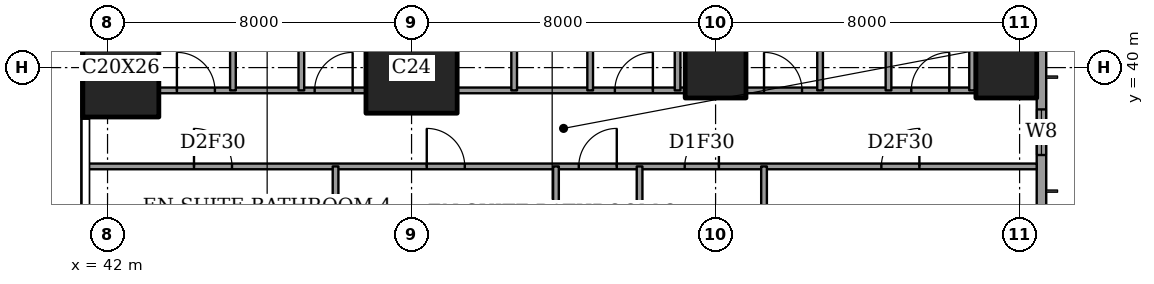
"""IFC4 building model, lengths in metres.
Left out: names, types, materials, properties, quantities, classifications, styles, units other than length and angle.
Written with IfcOpenShell. Run it as: python <this file> out.ifc"""

import sys

from ifc_helpers import new_model, si_unit, direction, frame, frame_2d, origin, origin_2d, place, context, subcontext, project, spatial, rectangle, extrude, element, fill, save


model = new_model("IFC4")
c1 = context("Model", 3, precision=1e-05, world=origin(), true_north=direction((0.0, 1.0)))
c2 = subcontext(c1, "Body", "Model", "MODEL_VIEW")
j1 = project(units=[si_unit("LENGTHUNIT", "METRE"), si_unit("PLANEANGLEUNIT", "RADIAN")], contexts=[c1])
p1 = place(None, origin())
s1 = spatial("IfcSite", under=j1, at=p1, CompositionType="ELEMENT")
p2 = place(p1, origin())
s2 = spatial("IfcBuilding", under=s1, at=p2, CompositionType="ELEMENT")
p3 = place(p2, frame((0.0, 0.0, 259.2)))
s3 = spatial("IfcBuildingStorey", under=s2, at=p3, CompositionType="ELEMENT", Elevation=259.2)
p4 = place(p3, frame((42.35, 40.0, 0.0), z_axis=(0.0, 0.0, 1.0), x_axis=(1.0, 0.0, 0.0)))
e1 = element("IfcColumn", 1, at=p4, inside=s3, PredefinedType="COLUMN", context=c2, shape_type="SweptSolid", body=[
    extrude(rectangle(XDim=2.0, YDim=2.6, at=origin_2d()), origin(), (0.0, 0.0, 1.0), 3.6),
])
p5 = place(p3, frame((50.0, 40.0, 0.0), z_axis=(0.0, 0.0, 1.0), x_axis=(1.0, 0.0, 0.0)))
e2 = element("IfcColumn", 2, at=p5, inside=s3, PredefinedType="COLUMN", context=c2, shape_type="SweptSolid", body=[
    extrude(rectangle(XDim=2.4, YDim=2.4, at=origin_2d()), origin(), (0.0, 0.0, 1.0), 3.6),
])
for number, where, z_axis, x_axis in (
    (3, (58.0, 40.0, 0.0), (0.0, 0.0, 1.0), (1.0, 0.0, 0.0)),
    (4, (65.65, 40.0, 0.0), (0.0, 0.0, 1.0), (1.0, 0.0, 0.0)),
):
    element("IfcColumn", number, at=place(p3, frame(where, z_axis=z_axis, x_axis=x_axis)), inside=s3, PredefinedType="COLUMN", context=c2, shape_type="SweptSolid", body=[
        extrude(rectangle(XDim=1.6, YDim=1.6, at=origin_2d()), origin(), (0.0, 0.0, 1.0), 3.6),
    ])
p6 = place(p3, frame((66.575, 3.175, 0.0), z_axis=(0.0, 0.0, 1.0), x_axis=(0.0, 1.0, 0.0)))
e5 = element("IfcWall", 5, at=p6, inside=s3, PredefinedType="SOLIDWALL", context=c2, shape_type="SweptSolid", body=[
    extrude(rectangle(XDim=41.65, YDim=0.25, at=frame_2d((20.825, 0.0))), origin(), (0.0, 0.0, 1.0), 3.6),
])
p7 = place(p6, frame((0.875, 0.0, 0.6)))
e6 = element("IfcOpeningElement", 6, at=p7, cuts=e5, PredefinedType="OPENING", context=c2, shape_type="SweptSolid", body=[
    extrude(rectangle(XDim=2.4, YDim=2.0, at=frame_2d((1.2, 1.0))), frame((0.0, 0.135, 0.0), z_axis=(0.0, -1.0, 0.0), x_axis=(1.0, 0.0, 0.0)), (0.0, 0.0, 1.0), 0.27),
])
p8 = place(p6, frame((6.6, 0.0, 0.6)))
e7 = element("IfcOpeningElement", 7, at=p8, cuts=e5, PredefinedType="OPENING", context=c2, shape_type="SweptSolid", body=[
    extrude(rectangle(XDim=1.2, YDim=2.0, at=frame_2d((0.6, 1.0))), frame((0.0, 0.135, 0.0), z_axis=(0.0, -1.0, 0.0), x_axis=(1.0, 0.0, 0.0)), (0.0, 0.0, 1.0), 0.27),
])
p9 = place(p6, frame((8.825, 0.0, 0.6)))
e8 = element("IfcOpeningElement", 8, at=p9, cuts=e5, PredefinedType="OPENING", context=c2, shape_type="SweptSolid", body=[
    extrude(rectangle(XDim=2.4, YDim=2.0, at=frame_2d((1.2, 1.0))), frame((0.0, 0.135, 0.0), z_axis=(0.0, -1.0, 0.0), x_axis=(1.0, 0.0, 0.0)), (0.0, 0.0, 1.0), 0.27),
])
p10 = place(p6, frame((15.725, 0.0, 0.6)))
e9 = element("IfcOpeningElement", 9, at=p10, cuts=e5, PredefinedType="OPENING", context=c2, shape_type="SweptSolid", body=[
    extrude(rectangle(XDim=2.4, YDim=2.0, at=frame_2d((1.2, 1.0))), frame((0.0, 0.135, 0.0), z_axis=(0.0, -1.0, 0.0), x_axis=(1.0, 0.0, 0.0)), (0.0, 0.0, 1.0), 0.27),
])
p11 = place(p6, frame((23.625, 0.0, 0.6)))
e10 = element("IfcOpeningElement", 10, at=p11, cuts=e5, PredefinedType="OPENING", context=c2, shape_type="SweptSolid", body=[
    extrude(rectangle(XDim=2.4, YDim=2.0, at=frame_2d((1.2, 1.0))), frame((0.0, 0.135, 0.0), z_axis=(0.0, -1.0, 0.0), x_axis=(1.0, 0.0, 0.0)), (0.0, 0.0, 1.0), 0.27),
])
p12 = place(p6, frame((30.725, 0.0, 0.6)))
e11 = element("IfcOpeningElement", 11, at=p12, cuts=e5, PredefinedType="OPENING", context=c2, shape_type="SweptSolid", body=[
    extrude(rectangle(XDim=2.4, YDim=2.0, at=frame_2d((1.2, 1.0))), frame((0.0, 0.135, 0.0), z_axis=(0.0, -1.0, 0.0), x_axis=(1.0, 0.0, 0.0)), (0.0, 0.0, 1.0), 0.27),
])
p13 = place(p6, frame((34.525, 0.0, 0.6)))
e12 = element("IfcOpeningElement", 12, at=p13, cuts=e5, PredefinedType="OPENING", context=c2, shape_type="SweptSolid", body=[
    extrude(rectangle(XDim=1.2, YDim=2.0, at=frame_2d((0.6, 1.0))), frame((0.0, 0.135, 0.0), z_axis=(0.0, -1.0, 0.0), x_axis=(1.0, 0.0, 0.0)), (0.0, 0.0, 1.0), 0.27),
])
p14 = place(p6, frame((38.375, 0.0, 0.6)))
e13 = element("IfcOpeningElement", 13, at=p14, cuts=e5, PredefinedType="OPENING", context=c2, shape_type="SweptSolid", body=[
    extrude(rectangle(XDim=2.4, YDim=2.0, at=frame_2d((1.2, 1.0))), frame((0.0, 0.135, 0.0), z_axis=(0.0, -1.0, 0.0), x_axis=(1.0, 0.0, 0.0)), (0.0, 0.0, 1.0), 0.27),
])
p15 = place(p3, frame((41.439, 37.4, 0.0), z_axis=(0.0, 0.0, 1.0), x_axis=(1.0, 0.0, 0.0)))
e14 = element("IfcWall", 14, at=p15, inside=s3, PredefinedType="PARTITIONING", context=c2, shape_type="SweptSolid", body=[
    extrude(rectangle(XDim=25.011, YDim=0.15, at=frame_2d((12.505, 0.0))), origin(), (0.0, 0.0, 1.0), 3.35),
])
p16 = place(p15, frame((12.961, 0.0, 0.0)))
e15 = element("IfcOpeningElement", 15, at=p16, cuts=e14, PredefinedType="OPENING", context=c2, shape_type="SweptSolid", body=[
    extrude(rectangle(XDim=1.0, YDim=2.1, at=frame_2d((0.5, 1.05))), frame((0.0, 0.085, 0.0), z_axis=(0.0, -1.0, 0.0), x_axis=(1.0, 0.0, 0.0)), (0.0, 0.0, 1.0), 0.17),
])
p17 = place(p15, frame((20.924, 0.0, 0.0)))
e16 = element("IfcOpeningElement", 16, at=p17, cuts=e14, PredefinedType="OPENING", context=c2, shape_type="SweptSolid", body=[
    extrude(rectangle(XDim=1.0, YDim=2.1, at=frame_2d((0.5, 1.05))), frame((0.0, 0.085, 0.0), z_axis=(0.0, -1.0, 0.0), x_axis=(1.0, 0.0, 0.0)), (0.0, 0.0, 1.0), 0.17),
])
p18 = place(p15, frame((15.749, 0.0, 0.0)))
e17 = element("IfcOpeningElement", 17, at=p18, cuts=e14, PredefinedType="OPENING", context=c2, shape_type="SweptSolid", body=[
    extrude(rectangle(XDim=0.9, YDim=2.1, at=frame_2d((0.45, 1.05))), frame((0.0, 0.085, 0.0), z_axis=(0.0, -1.0, 0.0), x_axis=(1.0, 0.0, 0.0)), (0.0, 0.0, 1.0), 0.17),
])
p19 = place(p15, frame((8.961, 0.0, 0.0)))
e18 = element("IfcOpeningElement", 18, at=p19, cuts=e14, PredefinedType="OPENING", context=c2, shape_type="SweptSolid", body=[
    extrude(rectangle(XDim=1.0, YDim=2.1, at=frame_2d((0.5, 1.05))), frame((0.0, 0.085, 0.0), z_axis=(0.0, -1.0, 0.0), x_axis=(1.0, 0.0, 0.0)), (0.0, 0.0, 1.0), 0.17),
])
p20 = place(p15, frame((2.836, 0.0, 0.0)))
e19 = element("IfcOpeningElement", 19, at=p20, cuts=e14, PredefinedType="OPENING", context=c2, shape_type="SweptSolid", body=[
    extrude(rectangle(XDim=1.0, YDim=2.1, at=frame_2d((0.5, 1.05))), frame((0.0, 0.085, 0.0), z_axis=(0.0, -1.0, 0.0), x_axis=(1.0, 0.0, 0.0)), (0.0, 0.0, 1.0), 0.17),
])
p21 = place(p3, frame((43.35, 39.4, 0.0), z_axis=(0.0, 0.0, 1.0), x_axis=(1.0, 0.0, 0.0)))
e20 = element("IfcWall", 20, at=p21, inside=s3, PredefinedType="PARTITIONING", context=c2, shape_type="SweptSolid", body=[
    extrude(rectangle(XDim=5.45, YDim=0.15, at=frame_2d((2.725, 0.0))), origin(), (0.0, 0.0, 1.0), 3.35),
])
p22 = place(p21, frame((4.1, 0.0, 0.0)))
e21 = element("IfcOpeningElement", 21, at=p22, cuts=e20, PredefinedType="OPENING", context=c2, shape_type="SweptSolid", body=[
    extrude(rectangle(XDim=1.0, YDim=2.1, at=frame_2d((0.5, 1.05))), frame((0.0, 0.085, 0.0), z_axis=(0.0, -1.0, 0.0), x_axis=(1.0, 0.0, 0.0)), (0.0, 0.0, 1.0), 0.17),
])
p23 = place(p21, frame((0.475, 0.0, 0.0)))
e22 = element("IfcOpeningElement", 22, at=p23, cuts=e20, PredefinedType="OPENING", context=c2, shape_type="SweptSolid", body=[
    extrude(rectangle(XDim=1.0, YDim=2.1, at=frame_2d((0.5, 1.05))), frame((0.0, 0.085, 0.0), z_axis=(0.0, -1.0, 0.0), x_axis=(1.0, 0.0, 0.0)), (0.0, 0.0, 1.0), 0.17),
])
p24 = place(p3, frame((51.2, 39.4, 0.0), z_axis=(0.0, 0.0, 1.0), x_axis=(1.0, 0.0, 0.0)))
e23 = element("IfcWall", 23, at=p24, inside=s3, PredefinedType="PARTITIONING", context=c2, shape_type="SweptSolid", body=[
    extrude(rectangle(XDim=6.0, YDim=0.15, at=frame_2d((3.0, 0.0))), origin(), (0.0, 0.0, 1.0), 3.35),
])
p25 = place(p24, frame((4.15, 0.0, 0.0)))
e24 = element("IfcOpeningElement", 24, at=p25, cuts=e23, PredefinedType="OPENING", context=c2, shape_type="SweptSolid", body=[
    extrude(rectangle(XDim=1.0, YDim=2.1, at=frame_2d((0.5, 1.05))), frame((0.0, 0.085, 0.0), z_axis=(0.0, -1.0, 0.0), x_axis=(1.0, 0.0, 0.0)), (0.0, 0.0, 1.0), 0.17),
])
p26 = place(p3, frame((58.8, 39.4, 0.0), z_axis=(0.0, 0.0, 1.0), x_axis=(1.0, 0.0, 0.0)))
e25 = element("IfcWall", 25, at=p26, inside=s3, PredefinedType="PARTITIONING", context=c2, shape_type="SweptSolid", body=[
    extrude(rectangle(XDim=6.05, YDim=0.15, at=frame_2d((3.025, 0.0))), origin(), (0.0, 0.0, 1.0), 3.35),
])
p27 = place(p26, frame((4.35, 0.0, 0.0)))
e26 = element("IfcOpeningElement", 26, at=p27, cuts=e25, PredefinedType="OPENING", context=c2, shape_type="SweptSolid", body=[
    extrude(rectangle(XDim=1.0, YDim=2.1, at=frame_2d((0.5, 1.05))), frame((0.0, 0.085, 0.0), z_axis=(0.0, -1.0, 0.0), x_axis=(1.0, 0.0, 0.0)), (0.0, 0.0, 1.0), 0.17),
])
p28 = place(p26, frame((0.475, 0.0, 0.0)))
e27 = element("IfcOpeningElement", 27, at=p28, cuts=e25, PredefinedType="OPENING", context=c2, shape_type="SweptSolid", body=[
    extrude(rectangle(XDim=1.0, YDim=2.1, at=frame_2d((0.5, 1.05))), frame((0.0, 0.085, 0.0), z_axis=(0.0, -1.0, 0.0), x_axis=(1.0, 0.0, 0.0)), (0.0, 0.0, 1.0), 0.17),
])
p29 = place(p3, frame((45.3, 39.4, 0.0), z_axis=(0.0, 0.0, 1.0), x_axis=(0.0, 1.0, 0.0)))
e28 = element("IfcWall", 28, at=p29, inside=s3, PredefinedType="PARTITIONING", context=c2, shape_type="SweptSolid", body=[
    extrude(rectangle(XDim=9.05, YDim=0.15, at=frame_2d((4.525, 0.0))), origin(), (0.0, 0.0, 1.0), 3.35),
])
p30 = place(p3, frame((47.1, 39.4, 0.0), z_axis=(0.0, 0.0, 1.0), x_axis=(0.0, 1.0, 0.0)))
e29 = element("IfcWall", 29, at=p30, inside=s3, PredefinedType="PARTITIONING", context=c2, shape_type="SweptSolid", body=[
    extrude(rectangle(XDim=3.5, YDim=0.15, at=frame_2d((1.75, 0.0))), origin(), (0.0, 0.0, 1.0), 3.35),
])
p31 = place(p30, frame((1.3, 0.0, 0.0)))
e30 = element("IfcOpeningElement", 30, at=p31, cuts=e29, PredefinedType="OPENING", context=c2, shape_type="SweptSolid", body=[
    extrude(rectangle(XDim=0.9, YDim=2.1, at=frame_2d((0.45, 1.05))), frame((0.0, 0.085, 0.0), z_axis=(0.0, -1.0, 0.0), x_axis=(1.0, 0.0, 0.0)), (0.0, 0.0, 1.0), 0.17),
])
p32 = place(p3, frame((48.0, 28.0, 0.0), z_axis=(0.0, 0.0, 1.0), x_axis=(0.0, 1.0, 0.0)))
e31 = element("IfcWall", 31, at=p32, inside=s3, PredefinedType="PARTITIONING", context=c2, shape_type="SweptSolid", body=[
    extrude(rectangle(XDim=9.4, YDim=0.15, at=frame_2d((4.7, 0.0))), origin(), (0.0, 0.0, 1.0), 3.35),
])
p33 = place(p32, frame((0.837, 0.0, 0.0)))
e32 = element("IfcOpeningElement", 32, at=p33, cuts=e31, PredefinedType="OPENING", context=c2, shape_type="SweptSolid", body=[
    extrude(rectangle(XDim=1.0, YDim=2.1, at=frame_2d((0.5, 1.05))), frame((0.0, 0.085, 0.0), z_axis=(0.0, -1.0, 0.0), x_axis=(1.0, 0.0, 0.0)), (0.0, 0.0, 1.0), 0.17),
])
p34 = place(p3, frame((52.7, 39.4, 0.0), z_axis=(0.0, 0.0, 1.0), x_axis=(0.0, 1.0, 0.0)))
e33 = element("IfcWall", 33, at=p34, inside=s3, PredefinedType="PARTITIONING", context=c2, shape_type="SweptSolid", body=[
    extrude(rectangle(XDim=9.05, YDim=0.15, at=frame_2d((4.525, 0.0))), origin(), (0.0, 0.0, 1.0), 3.35),
])
p35 = place(p34, frame((5.675, 0.0, 0.0)))
e34 = element("IfcOpeningElement", 34, at=p35, cuts=e33, PredefinedType="OPENING", context=c2, shape_type="SweptSolid", body=[
    extrude(rectangle(XDim=0.9, YDim=2.1, at=frame_2d((0.45, 1.05))), frame((0.0, 0.085, 0.0), z_axis=(0.0, -1.0, 0.0), x_axis=(1.0, 0.0, 0.0)), (0.0, 0.0, 1.0), 0.17),
])
p36 = place(p3, frame((53.8, 30.675, 0.0), z_axis=(0.0, 0.0, 1.0), x_axis=(0.0, 1.0, 0.0)))
e35 = element("IfcWall", 35, at=p36, inside=s3, PredefinedType="PARTITIONING", context=c2, shape_type="SweptSolid", body=[
    extrude(rectangle(XDim=6.725, YDim=0.15, at=frame_2d((3.362, 0.0))), origin(), (0.0, 0.0, 1.0), 3.35),
])
p37 = place(p3, frame((54.7, 39.4, 0.0), z_axis=(0.0, 0.0, 1.0), x_axis=(0.0, 1.0, 0.0)))
e36 = element("IfcWall", 36, at=p37, inside=s3, PredefinedType="PARTITIONING", context=c2, shape_type="SweptSolid", body=[
    extrude(rectangle(XDim=3.2, YDim=0.15, at=frame_2d((1.6, 0.0))), origin(), (0.0, 0.0, 1.0), 3.35),
])
p38 = place(p37, frame((1.15, 0.0, 0.0)))
e37 = element("IfcOpeningElement", 37, at=p38, cuts=e36, PredefinedType="OPENING", context=c2, shape_type="SweptSolid", body=[
    extrude(rectangle(XDim=0.9, YDim=2.1, at=frame_2d((0.45, 1.05))), frame((0.0, 0.085, 0.0), z_axis=(0.0, -1.0, 0.0), x_axis=(1.0, 0.0, 0.0)), (0.0, 0.0, 1.0), 0.17),
])
p39 = place(p3, frame((56.0, 28.0, 0.0), z_axis=(0.0, 0.0, 1.0), x_axis=(0.0, 1.0, 0.0)))
e38 = element("IfcWall", 38, at=p39, inside=s3, PredefinedType="PARTITIONING", context=c2, shape_type="SweptSolid", body=[
    extrude(rectangle(XDim=9.4, YDim=0.15, at=frame_2d((4.7, 0.0))), origin(), (0.0, 0.0, 1.0), 3.35),
])
p40 = place(p39, frame((0.837, 0.0, 0.0)))
e39 = element("IfcOpeningElement", 39, at=p40, cuts=e38, PredefinedType="OPENING", context=c2, shape_type="SweptSolid", body=[
    extrude(rectangle(XDim=1.0, YDim=2.1, at=frame_2d((0.5, 1.05))), frame((0.0, 0.085, 0.0), z_axis=(0.0, -1.0, 0.0), x_axis=(1.0, 0.0, 0.0)), (0.0, 0.0, 1.0), 0.17),
])
p41 = place(p3, frame((57.0, 39.4, 0.0), z_axis=(0.0, 0.0, 1.0), x_axis=(0.0, 1.0, 0.0)))
e40 = element("IfcWall", 40, at=p41, inside=s3, PredefinedType="PARTITIONING", context=c2, shape_type="SweptSolid", body=[
    extrude(rectangle(XDim=9.05, YDim=0.15, at=frame_2d((4.525, 0.0))), origin(), (0.0, 0.0, 1.0), 3.35),
])
p42 = place(p3, frame((59.275, 33.2, 0.0), z_axis=(0.0, 0.0, 1.0), x_axis=(0.0, 1.0, 0.0)))
e41 = element("IfcWall", 41, at=p42, inside=s3, PredefinedType="PARTITIONING", context=c2, shape_type="SweptSolid", body=[
    extrude(rectangle(XDim=4.2, YDim=0.15, at=frame_2d((2.1, 0.0))), origin(), (0.0, 0.0, 1.0), 3.35),
])
p43 = place(p3, frame((60.75, 39.4, 0.0), z_axis=(0.0, 0.0, 1.0), x_axis=(0.0, 1.0, 0.0)))
e42 = element("IfcWall", 42, at=p43, inside=s3, PredefinedType="PARTITIONING", context=c2, shape_type="SweptSolid", body=[
    extrude(rectangle(XDim=9.05, YDim=0.15, at=frame_2d((4.525, 0.0))), origin(), (0.0, 0.0, 1.0), 3.35),
])
p44 = place(p3, frame((62.55, 39.4, 0.0), z_axis=(0.0, 0.0, 1.0), x_axis=(0.0, 1.0, 0.0)))
e43 = element("IfcWall", 43, at=p44, inside=s3, PredefinedType="PARTITIONING", context=c2, shape_type="SweptSolid", body=[
    extrude(rectangle(XDim=3.5, YDim=0.15, at=frame_2d((1.75, 0.0))), origin(), (0.0, 0.0, 1.0), 3.35),
])
p45 = place(p44, frame((1.3, 0.0, 0.0)))
e44 = element("IfcOpeningElement", 44, at=p45, cuts=e43, PredefinedType="OPENING", context=c2, shape_type="SweptSolid", body=[
    extrude(rectangle(XDim=0.9, YDim=2.1, at=frame_2d((0.45, 1.05))), frame((0.0, 0.085, 0.0), z_axis=(0.0, -1.0, 0.0), x_axis=(1.0, 0.0, 0.0)), (0.0, 0.0, 1.0), 0.17),
])
p46 = place(p3, frame((64.75, 39.4, 0.0), z_axis=(0.0, 0.0, 1.0), x_axis=(0.0, 1.0, 0.0)))
e45 = element("IfcWall", 45, at=p46, inside=s3, PredefinedType="PARTITIONING", context=c2, shape_type="SweptSolid", body=[
    extrude(rectangle(XDim=5.3, YDim=0.15, at=frame_2d((2.65, 0.0))), origin(), (0.0, 0.0, 1.0), 3.35),
])
p47 = place(p46, frame((2.2, 0.0, 0.0)))
e46 = element("IfcOpeningElement", 46, at=p47, cuts=e45, PredefinedType="OPENING", context=c2, shape_type="SweptSolid", body=[
    extrude(rectangle(XDim=0.9, YDim=2.1, at=frame_2d((0.45, 1.05))), frame((0.0, 0.085, 0.0), z_axis=(0.0, -1.0, 0.0), x_axis=(1.0, 0.0, 0.0)), (0.0, 0.0, 1.0), 0.17),
])
p48 = place(p13, origin())
e47 = element("IfcWindow", 47, at=p48, inside=s3, PartitioningType="SINGLE_PANEL", PredefinedType="WINDOW", context=c2, shape_type="SweptSolid", body=[
    extrude(rectangle(XDim=1.2, YDim=2.0, at=frame_2d((0.6, 1.0))), frame((0.0, 0.03, 0.0), z_axis=(0.0, -1.0, 0.0), x_axis=(1.0, 0.0, 0.0)), (0.0, 0.0, 1.0), 0.06),
])
fill(e12, e47)
p49 = place(p27, origin())
e48 = element("IfcDoor", 48, at=p49, inside=s3, OperationType="SINGLE_SWING_LEFT", PredefinedType="DOOR", context=c2, shape_type="SweptSolid", body=[
    extrude(rectangle(XDim=1.0, YDim=2.1, at=frame_2d((0.5, 1.05))), frame((0.0, 0.025, 0.0), z_axis=(0.0, -1.0, 0.0), x_axis=(1.0, 0.0, 0.0)), (0.0, 0.0, 1.0), 0.05),
])
fill(e26, e48)
p50 = place(p28, origin())
e49 = element("IfcDoor", 49, at=p50, inside=s3, OperationType="SINGLE_SWING_RIGHT", PredefinedType="DOOR", context=c2, shape_type="SweptSolid", body=[
    extrude(rectangle(XDim=1.0, YDim=2.1, at=frame_2d((0.5, 1.05))), frame((0.0, 0.025, 0.0), z_axis=(0.0, -1.0, 0.0), x_axis=(1.0, 0.0, 0.0)), (0.0, 0.0, 1.0), 0.05),
])
fill(e27, e49)
p51 = place(p25, origin())
e50 = element("IfcDoor", 50, at=p51, inside=s3, OperationType="SINGLE_SWING_LEFT", PredefinedType="DOOR", context=c2, shape_type="SweptSolid", body=[
    extrude(rectangle(XDim=1.0, YDim=2.1, at=frame_2d((0.5, 1.05))), frame((0.0, 0.025, 0.0), z_axis=(0.0, -1.0, 0.0), x_axis=(1.0, 0.0, 0.0)), (0.0, 0.0, 1.0), 0.05),
])
fill(e24, e50)
p52 = place(p22, origin())
e51 = element("IfcDoor", 51, at=p52, inside=s3, OperationType="SINGLE_SWING_LEFT", PredefinedType="DOOR", context=c2, shape_type="SweptSolid", body=[
    extrude(rectangle(XDim=1.0, YDim=2.1, at=frame_2d((0.5, 1.05))), frame((0.0, 0.025, 0.0), z_axis=(0.0, -1.0, 0.0), x_axis=(1.0, 0.0, 0.0)), (0.0, 0.0, 1.0), 0.05),
])
fill(e21, e51)
p53 = place(p23, origin())
e52 = element("IfcDoor", 52, at=p53, inside=s3, OperationType="SINGLE_SWING_RIGHT", PredefinedType="DOOR", context=c2, shape_type="SweptSolid", body=[
    extrude(rectangle(XDim=1.0, YDim=2.1, at=frame_2d((0.5, 1.05))), frame((0.0, 0.025, 0.0), z_axis=(0.0, -1.0, 0.0), x_axis=(1.0, 0.0, 0.0)), (0.0, 0.0, 1.0), 0.05),
])
fill(e22, e52)
p54 = place(p16, origin())
e53 = element("IfcDoor", 53, at=p54, inside=s3, OperationType="SINGLE_SWING_LEFT", PredefinedType="DOOR", context=c2, shape_type="SweptSolid", body=[
    extrude(rectangle(XDim=1.0, YDim=2.1, at=frame_2d((0.5, 1.05))), frame((0.0, 0.025, 0.0), z_axis=(0.0, -1.0, 0.0), x_axis=(1.0, 0.0, 0.0)), (0.0, 0.0, 1.0), 0.05),
])
fill(e15, e53)
p55 = place(p17, origin())
e54 = element("IfcDoor", 54, at=p55, inside=s3, OperationType="SINGLE_SWING_LEFT", PredefinedType="DOOR", context=c2, shape_type="SweptSolid", body=[
    extrude(rectangle(XDim=1.0, YDim=2.1, at=frame_2d((0.5, 1.05))), frame((0.0, 0.025, 0.0), z_axis=(0.0, -1.0, 0.0), x_axis=(1.0, 0.0, 0.0)), (0.0, 0.0, 1.0), 0.05),
])
fill(e16, e54)
p56 = place(p18, origin())
e55 = element("IfcDoor", 55, at=p56, inside=s3, OperationType="SINGLE_SWING_LEFT", PredefinedType="DOOR", context=c2, shape_type="SweptSolid", body=[
    extrude(rectangle(XDim=0.9, YDim=2.1, at=frame_2d((0.45, 1.05))), frame((0.0, 0.025, 0.0), z_axis=(0.0, -1.0, 0.0), x_axis=(1.0, 0.0, 0.0)), (0.0, 0.0, 1.0), 0.05),
])
fill(e17, e55)
p57 = place(p19, origin())
e56 = element("IfcDoor", 56, at=p57, inside=s3, OperationType="SINGLE_SWING_RIGHT", PredefinedType="DOOR", context=c2, shape_type="SweptSolid", body=[
    extrude(rectangle(XDim=1.0, YDim=2.1, at=frame_2d((0.5, 1.05))), frame((0.0, 0.025, 0.0), z_axis=(0.0, -1.0, 0.0), x_axis=(1.0, 0.0, 0.0)), (0.0, 0.0, 1.0), 0.05),
])
fill(e18, e56)
p58 = place(p20, origin())
e57 = element("IfcDoor", 57, at=p58, inside=s3, OperationType="SINGLE_SWING_RIGHT", PredefinedType="DOOR", context=c2, shape_type="SweptSolid", body=[
    extrude(rectangle(XDim=1.0, YDim=2.1, at=frame_2d((0.5, 1.05))), frame((0.0, 0.025, 0.0), z_axis=(0.0, -1.0, 0.0), x_axis=(1.0, 0.0, 0.0)), (0.0, 0.0, 1.0), 0.05),
])
fill(e19, e57)
save(model, sys.argv[1])
